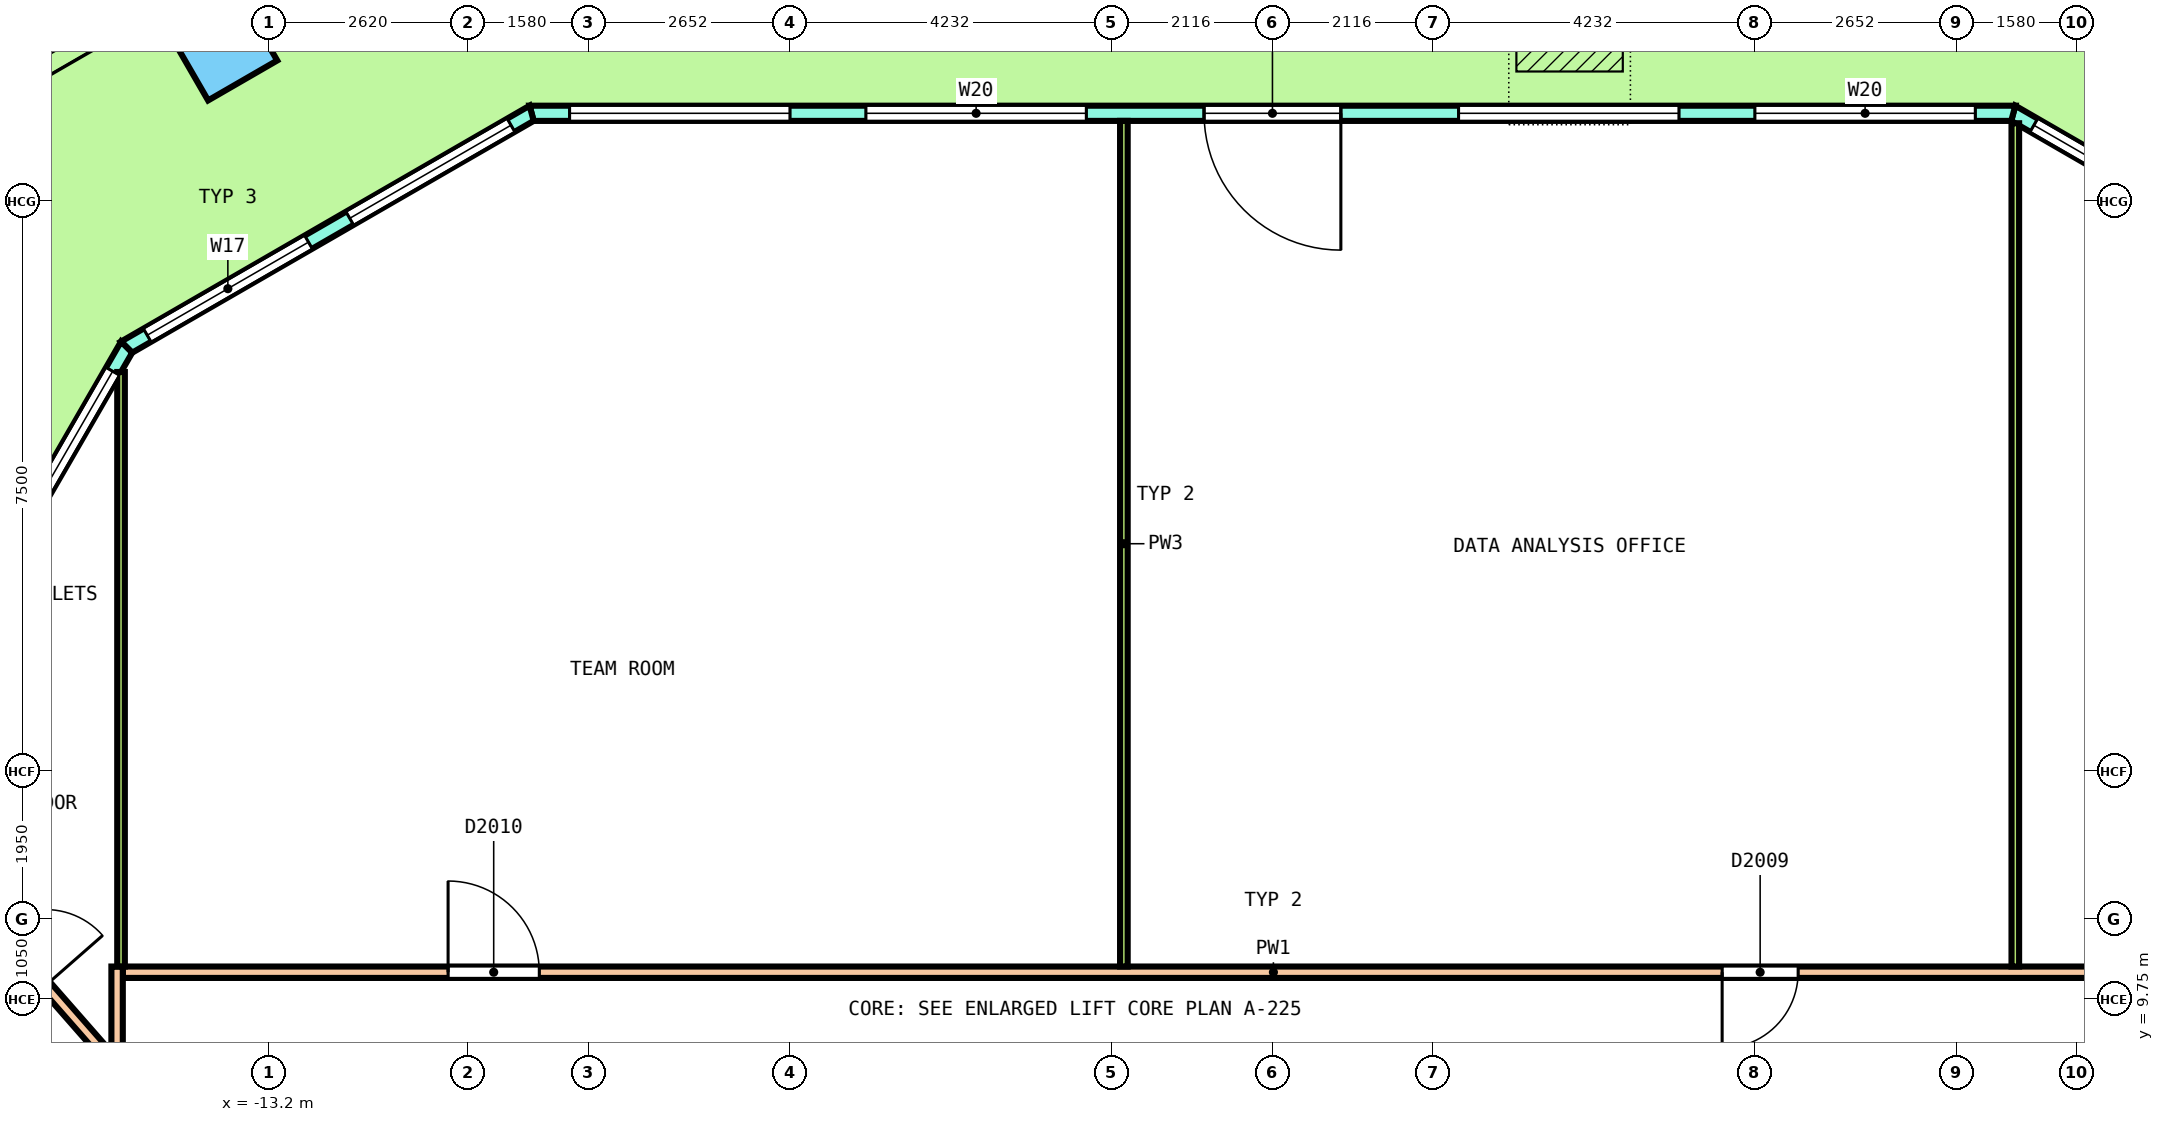
"""IFC4 building model, lengths in metres.
Left out: names, types, materials, properties, quantities, classifications, styles, units other than length and angle.
Written with IfcOpenShell. Run it as: python <this file> out.ifc"""

import sys

from ifc_helpers import new_model, si_unit, direction, frame, frame_2d, origin, origin_2d, place, context, subcontext, project, spatial, polyline, rectangle, outline, extrude, element, fill, save


model = new_model("IFC4")
c1 = context("Model", 3, precision=1e-05, world=origin(), true_north=direction((0.0, 1.0)))
c2 = subcontext(c1, "Body", "Model", "MODEL_VIEW")
j1 = project(units=[si_unit("LENGTHUNIT", "METRE"), si_unit("PLANEANGLEUNIT", "RADIAN")], contexts=[c1])
p1 = place(None, origin())
s1 = spatial("IfcSite", under=j1, at=p1, CompositionType="ELEMENT")
p2 = place(p1, origin())
s2 = spatial("IfcBuilding", under=s1, at=p2, CompositionType="ELEMENT")
p3 = place(p2, frame((0.0, 0.0, 237.4)))
s3 = spatial("IfcBuildingStorey", under=s2, at=p3, CompositionType="ELEMENT", Elevation=237.4)
p4 = place(p3, frame((-13.811, 22.287, 0.0), z_axis=(-0.036227958345, 0.0, 0.999343552055), x_axis=(-0.865314717209, -0.500246354177, -0.031369177763)))
e1 = element("IfcColumn", 1, at=p4, inside=s3, PredefinedType="COLUMN", context=c2, shape_type="SweptSolid", body=[
    extrude(rectangle(XDim=1.05, YDim=1.05, at=origin_2d()), origin(), (0.0, 0.0, 1.0), 3.653),
])
p5 = place(p3, frame((15.075, 18.323, 0.0), z_axis=(0.0, 0.0, 1.0), x_axis=(-0.866029647142, 0.499992650217, 0.0)))
e2 = element("IfcWall", 2, at=p5, inside=s3, PredefinedType="SOLIDWALL", context=c2, shape_type="SweptSolid", body=[
    extrude(outline(polyline([(-0.027, -0.1), (1.008, -0.1), (2.042, -0.1), (3.076, -0.1), (4.111, -0.1), (5.145, -0.1), (6.18, -0.1), (6.126, 0.1), (5.109, 0.1), (4.093, 0.1), (3.076, 0.1), (2.06, 0.1), (1.043, 0.1), (0.027, 0.1), (-0.027, -0.1)])), origin(), (0.0, 0.0, 1.0), 3.7),
])
p6 = place(p5, frame((0.313, 0.0, 0.1)))
e3 = element("IfcOpeningElement", 3, at=p6, cuts=e2, PredefinedType="OPENING", context=c2, shape_type="SweptSolid", body=[
    extrude(rectangle(XDim=2.45, YDim=2.65, at=frame_2d((1.225, 1.325))), frame((0.0, 0.11, 0.0), z_axis=(0.0, -1.0, 0.0), x_axis=(1.0, 0.0, 0.0)), (0.0, 0.0, 1.0), 0.22),
])
p7 = place(p5, frame((3.39, 0.0, 0.1)))
e4 = element("IfcOpeningElement", 4, at=p7, cuts=e2, PredefinedType="OPENING", context=c2, shape_type="SweptSolid", body=[
    extrude(rectangle(XDim=2.45, YDim=2.65, at=frame_2d((1.225, 1.325))), frame((0.0, 0.11, 0.0), z_axis=(0.0, -1.0, 0.0), x_axis=(1.0, 0.0, 0.0)), (0.0, 0.0, 1.0), 0.22),
])
p8 = place(p3, frame((9.746, 21.4, 0.0), z_axis=(0.0, 0.0, 1.0), x_axis=(-1.0, 0.0, 0.0)))
e5 = element("IfcWall", 5, at=p8, inside=s3, PredefinedType="SOLIDWALL", context=c2, shape_type="SweptSolid", body=[
    extrude(outline(polyline([(-0.027, -0.1), (1.002, -0.1), (2.031, -0.1), (3.059, -0.1), (4.088, -0.1), (5.117, -0.1), (6.146, -0.1), (7.175, -0.1), (8.203, -0.1), (9.232, -0.1), (10.261, -0.1), (11.29, -0.1), (12.318, -0.1), (13.347, -0.1), (14.376, -0.1), (15.405, -0.1), (16.433, -0.1), (17.462, -0.1), (18.491, -0.1), (19.52, -0.1), (19.466, 0.1), (18.443, 0.1), (17.42, 0.1), (16.396, 0.1), (15.373, 0.1), (14.35, 0.1), (13.327, 0.1), (12.304, 0.1), (11.281, 0.1), (10.258, 0.1), (9.235, 0.1), (8.212, 0.1), (7.188, 0.1), (6.166, 0.1), (5.142, 0.1), (4.119, 0.1), (3.096, 0.1), (2.073, 0.1), (1.05, 0.1), (0.027, 0.1), (-0.027, -0.1)])), origin(), (0.0, 0.0, 1.0), 3.7),
])
p9 = place(p8, frame((0.499, 0.0, 0.1)))
e6 = element("IfcOpeningElement", 6, at=p9, cuts=e5, PredefinedType="OPENING", context=c2, shape_type="SweptSolid", body=[
    extrude(rectangle(XDim=2.9, YDim=2.65, at=frame_2d((1.45, 1.325))), frame((0.0, 0.11, 0.0), z_axis=(0.0, -1.0, 0.0), x_axis=(1.0, 0.0, 0.0)), (0.0, 0.0, 1.0), 0.22),
])
p10 = place(p8, frame((4.398, 0.0, 0.1)))
e7 = element("IfcOpeningElement", 7, at=p10, cuts=e5, PredefinedType="OPENING", context=c2, shape_type="SweptSolid", body=[
    extrude(rectangle(XDim=2.9, YDim=2.65, at=frame_2d((1.45, 1.325))), frame((0.0, 0.11, 0.0), z_axis=(0.0, -1.0, 0.0), x_axis=(1.0, 0.0, 0.0)), (0.0, 0.0, 1.0), 0.22),
])
p11 = place(p8, frame((8.846, 0.0, 0.0)))
e8 = element("IfcOpeningElement", 8, at=p11, cuts=e5, PredefinedType="OPENING", context=c2, shape_type="SweptSolid", body=[
    extrude(rectangle(XDim=1.8, YDim=2.4, at=frame_2d((0.9, 1.2))), frame((0.0, 0.11, 0.0), z_axis=(0.0, -1.0, 0.0), x_axis=(1.0, 0.0, 0.0)), (0.0, 0.0, 1.0), 0.22),
])
p12 = place(p8, frame((8.846, 0.0, 2.55)))
e9 = element("IfcOpeningElement", 9, at=p12, cuts=e5, PredefinedType="OPENING", context=c2, shape_type="SweptSolid", body=[
    extrude(rectangle(XDim=1.8, YDim=0.2, at=frame_2d((0.9, 0.1))), frame((0.0, 0.11, 0.0), z_axis=(0.0, -1.0, 0.0), x_axis=(1.0, 0.0, 0.0)), (0.0, 0.0, 1.0), 0.22),
])
p13 = place(p8, frame((12.195, 0.0, 0.1)))
e10 = element("IfcOpeningElement", 10, at=p13, cuts=e5, PredefinedType="OPENING", context=c2, shape_type="SweptSolid", body=[
    extrude(rectangle(XDim=2.9, YDim=2.65, at=frame_2d((1.45, 1.325))), frame((0.0, 0.11, 0.0), z_axis=(0.0, -1.0, 0.0), x_axis=(1.0, 0.0, 0.0)), (0.0, 0.0, 1.0), 0.22),
])
p14 = place(p8, frame((16.094, 0.0, 0.1)))
e11 = element("IfcOpeningElement", 11, at=p14, cuts=e5, PredefinedType="OPENING", context=c2, shape_type="SweptSolid", body=[
    extrude(rectangle(XDim=2.9, YDim=2.65, at=frame_2d((1.45, 1.325))), frame((0.0, 0.11, 0.0), z_axis=(0.0, -1.0, 0.0), x_axis=(1.0, 0.0, 0.0)), (0.0, 0.0, 1.0), 0.22),
])
p15 = place(p3, frame((-9.746, 21.4, 0.0), z_axis=(0.0, 0.0, 1.0), x_axis=(-0.866029647142, -0.499992650217, 0.0)))
e12 = element("IfcWall", 12, at=p15, inside=s3, PredefinedType="SOLIDWALL", context=c2, shape_type="SweptSolid", body=[
    extrude(outline(polyline([(-0.027, -0.1), (1.008, -0.1), (2.042, -0.1), (3.076, -0.1), (4.111, -0.1), (5.145, -0.1), (6.18, -0.1), (6.126, 0.1), (5.109, 0.1), (4.093, 0.1), (3.076, 0.1), (2.06, 0.1), (1.043, 0.1), (0.027, 0.1), (-0.027, -0.1)])), origin(), (0.0, 0.0, 1.0), 3.7),
])
p16 = place(p15, frame((0.313, 0.0, 0.1)))
e13 = element("IfcOpeningElement", 13, at=p16, cuts=e12, PredefinedType="OPENING", context=c2, shape_type="SweptSolid", body=[
    extrude(rectangle(XDim=2.45, YDim=2.65, at=frame_2d((1.225, 1.325))), frame((0.0, 0.11, 0.0), z_axis=(0.0, -1.0, 0.0), x_axis=(1.0, 0.0, 0.0)), (0.0, 0.0, 1.0), 0.22),
])
p17 = place(p15, frame((3.39, 0.0, 0.1)))
e14 = element("IfcOpeningElement", 14, at=p17, cuts=e12, PredefinedType="OPENING", context=c2, shape_type="SweptSolid", body=[
    extrude(rectangle(XDim=2.45, YDim=2.65, at=frame_2d((1.225, 1.325))), frame((0.0, 0.11, 0.0), z_axis=(0.0, -1.0, 0.0), x_axis=(1.0, 0.0, 0.0)), (0.0, 0.0, 1.0), 0.22),
])
p18 = place(p3, frame((-15.075, 18.323, 0.0), z_axis=(0.0, 0.0, 1.0), x_axis=(-0.49999683882, -0.866027228885, 0.0)))
e15 = element("IfcWall", 15, at=p18, inside=s3, PredefinedType="SOLIDWALL", context=c2, shape_type="SweptSolid", body=[
    extrude(outline(polyline([(-0.027, -0.1), (1.018, -0.1), (2.062, -0.1), (3.107, -0.1), (4.152, -0.1), (5.197, -0.1), (6.242, -0.1), (7.286, -0.1), (8.331, -0.1), (9.376, -0.1), (10.42, -0.1), (11.465, -0.1), (12.51, -0.1), (13.555, -0.1), (14.6, -0.1), (15.644, -0.1), (16.689, -0.1), (16.635, 0.1), (15.597, 0.1), (14.559, 0.1), (13.521, 0.1), (12.483, 0.1), (11.445, 0.1), (10.407, 0.1), (9.369, 0.1), (8.331, 0.1), (7.293, 0.1), (6.255, 0.1), (5.217, 0.1), (4.179, 0.1), (3.141, 0.1), (2.103, 0.1), (1.065, 0.1), (0.027, 0.1), (-0.027, -0.1)])), origin(), (0.0, 0.0, 1.0), 3.7),
])
p19 = place(p18, frame((0.366, 0.0, 0.1)))
e16 = element("IfcOpeningElement", 16, at=p19, cuts=e15, PredefinedType="OPENING", context=c2, shape_type="SweptSolid", body=[
    extrude(rectangle(XDim=2.6, YDim=2.65, at=frame_2d((1.3, 1.325))), frame((0.0, 0.11, 0.0), z_axis=(0.0, -1.0, 0.0), x_axis=(1.0, 0.0, 0.0)), (0.0, 0.0, 1.0), 0.22),
])
p20 = place(p18, frame((3.699, 0.0, 0.1)))
e17 = element("IfcOpeningElement", 17, at=p20, cuts=e15, PredefinedType="OPENING", context=c2, shape_type="SweptSolid", body=[
    extrude(rectangle(XDim=2.6, YDim=2.65, at=frame_2d((1.3, 1.325))), frame((0.0, 0.11, 0.0), z_axis=(0.0, -1.0, 0.0), x_axis=(1.0, 0.0, 0.0)), (0.0, 0.0, 1.0), 0.22),
])
p21 = place(p18, frame((7.431, 0.0, 0.0)))
e18 = element("IfcOpeningElement", 18, at=p21, cuts=e15, PredefinedType="OPENING", context=c2, shape_type="SweptSolid", body=[
    extrude(rectangle(XDim=1.8, YDim=2.4, at=frame_2d((0.9, 1.2))), frame((0.0, 0.11, 0.0), z_axis=(0.0, -1.0, 0.0), x_axis=(1.0, 0.0, 0.0)), (0.0, 0.0, 1.0), 0.22),
])
p22 = place(p18, frame((7.431, 0.0, 2.55)))
e19 = element("IfcOpeningElement", 19, at=p22, cuts=e15, PredefinedType="OPENING", context=c2, shape_type="SweptSolid", body=[
    extrude(rectangle(XDim=1.8, YDim=0.2, at=frame_2d((0.9, 0.1))), frame((0.0, 0.11, 0.0), z_axis=(0.0, -1.0, 0.0), x_axis=(1.0, 0.0, 0.0)), (0.0, 0.0, 1.0), 0.22),
])
p23 = place(p18, frame((10.364, 0.0, 0.1)))
e20 = element("IfcOpeningElement", 20, at=p23, cuts=e15, PredefinedType="OPENING", context=c2, shape_type="SweptSolid", body=[
    extrude(rectangle(XDim=2.6, YDim=2.65, at=frame_2d((1.3, 1.325))), frame((0.0, 0.11, 0.0), z_axis=(0.0, -1.0, 0.0), x_axis=(1.0, 0.0, 0.0)), (0.0, 0.0, 1.0), 0.22),
])
p24 = place(p18, frame((13.696, 0.0, 0.1)))
e21 = element("IfcOpeningElement", 21, at=p24, cuts=e15, PredefinedType="OPENING", context=c2, shape_type="SweptSolid", body=[
    extrude(rectangle(XDim=2.6, YDim=2.65, at=frame_2d((1.3, 1.325))), frame((0.0, 0.11, 0.0), z_axis=(0.0, -1.0, 0.0), x_axis=(1.0, 0.0, 0.0)), (0.0, 0.0, 1.0), 0.22),
])
p25 = place(p3, frame((-18.352, 12.447, 0.0), z_axis=(0.0, 0.0, 1.0), x_axis=(0.659058801192, -0.752091415036, 0.0)))
e22 = element("IfcWall", 22, at=p25, inside=s3, PredefinedType="PARTITIONING", context=c2, shape_type="SweptSolid", body=[
    extrude(rectangle(XDim=4.708, YDim=0.15, at=frame_2d((2.354, 0.0))), origin(), (0.0, 0.0, 1.0), 2.8),
])
p26 = place(p25, frame((2.354, 0.0, 0.0)))
e23 = element("IfcOpeningElement", 23, at=p26, cuts=e22, PredefinedType="OPENING", context=c2, shape_type="SweptSolid", body=[
    extrude(rectangle(XDim=1.0, YDim=2.1, at=frame_2d((0.5, 1.05))), frame((0.0, 0.085, 0.0), z_axis=(0.0, -1.0, 0.0), x_axis=(1.0, 0.0, 0.0)), (0.0, 0.0, 1.0), 0.17),
])
p27 = place(p3, frame((-19.985, 9.619, 0.0), z_axis=(0.0, 0.0, 1.0), x_axis=(0.888662364403, -0.458562102767, 0.0)))
e24 = element("IfcWall", 24, at=p27, inside=s3, PredefinedType="PARTITIONING", context=c2, shape_type="SweptSolid", body=[
    extrude(rectangle(XDim=5.31, YDim=0.15, at=frame_2d((2.655, 0.0))), origin(), (0.0, 0.0, 1.0), 2.8),
])
p28 = place(p3, frame((-15.125, 10.1, 0.0), z_axis=(0.0, 0.0, 1.0), x_axis=(1.0, 0.0, 0.0)))
e25 = element("IfcWall", 25, at=p28, inside=s3, PredefinedType="PARTITIONING", context=c2, shape_type="SweptSolid", body=[
    extrude(rectangle(XDim=30.275, YDim=0.15, at=frame_2d((15.137, 0.0))), origin(), (0.0, 0.0, 1.0), 2.8),
])
p29 = place(p28, frame((28.004, 0.0, 0.0)))
e26 = element("IfcOpeningElement", 26, at=p29, cuts=e25, PredefinedType="OPENING", context=c2, shape_type="SweptSolid", body=[
    extrude(rectangle(XDim=1.0, YDim=2.1, at=frame_2d((0.5, 1.05))), frame((0.0, 0.085, 0.0), z_axis=(0.0, -1.0, 0.0), x_axis=(1.0, 0.0, 0.0)), (0.0, 0.0, 1.0), 0.17),
])
p30 = place(p28, frame((21.041, 0.0, 0.0)))
e27 = element("IfcOpeningElement", 27, at=p30, cuts=e25, PredefinedType="OPENING", context=c2, shape_type="SweptSolid", body=[
    extrude(rectangle(XDim=1.0, YDim=2.1, at=frame_2d((0.5, 1.05))), frame((0.0, 0.085, 0.0), z_axis=(0.0, -1.0, 0.0), x_axis=(1.0, 0.0, 0.0)), (0.0, 0.0, 1.0), 0.17),
])
p31 = place(p28, frame((4.28, 0.0, 0.0)))
e28 = element("IfcOpeningElement", 28, at=p31, cuts=e25, PredefinedType="OPENING", context=c2, shape_type="SweptSolid", body=[
    extrude(rectangle(XDim=1.2, YDim=2.1, at=frame_2d((0.6, 1.05))), frame((0.0, 0.085, 0.0), z_axis=(0.0, -1.0, 0.0), x_axis=(1.0, 0.0, 0.0)), (0.0, 0.0, 1.0), 0.17),
])
p32 = place(p3, frame((-15.2, 8.775, 0.0), z_axis=(0.0, 0.0, 1.0), x_axis=(0.0, 1.0, 0.0)))
e29 = element("IfcWall", 29, at=p32, inside=s3, PredefinedType="PARTITIONING", context=c2, shape_type="SweptSolid", body=[
    extrude(rectangle(XDim=1.4, YDim=0.15, at=frame_2d((0.7, 0.0))), origin(), (0.0, 0.0, 1.0), 2.8),
])
p33 = place(p3, frame((9.773, 10.175, 0.0), z_axis=(0.0, 0.0, 1.0), x_axis=(0.0, 1.0, 0.0)))
e30 = element("IfcWall", 30, at=p33, inside=s3, PredefinedType="PARTITIONING", context=c2, shape_type="SweptSolid", body=[
    extrude(rectangle(XDim=11.094, YDim=0.1, at=frame_2d((5.547, 0.0))), origin(), (0.0, 0.0, 1.0), 2.8),
])
p34 = place(p3, frame((-1.955, 10.175, 0.0), z_axis=(0.0, 0.0, 1.0), x_axis=(0.0, 1.0, 0.0)))
e31 = element("IfcWall", 31, at=p34, inside=s3, PredefinedType="PARTITIONING", context=c2, shape_type="SweptSolid", body=[
    extrude(rectangle(XDim=11.125, YDim=0.1, at=frame_2d((5.562, 0.0))), origin(), (0.0, 0.0, 1.0), 2.8),
])
p35 = place(p3, frame((-15.148, 10.175, 0.0), z_axis=(0.0, 0.0, 1.0), x_axis=(0.0, 1.0, 0.0)))
e32 = element("IfcWall", 32, at=p35, inside=s3, PredefinedType="PARTITIONING", context=c2, shape_type="SweptSolid", body=[
    extrude(rectangle(XDim=7.822, YDim=0.1, at=frame_2d((3.911, 0.0))), origin(), (0.0, 0.0, 1.0), 2.8),
])
p36 = place(p7, origin())
e33 = element("IfcWindow", 33, at=p36, inside=s3, PartitioningType="SINGLE_PANEL", PredefinedType="WINDOW", context=c2, shape_type="SweptSolid", body=[
    extrude(rectangle(XDim=2.45, YDim=2.65, at=frame_2d((1.225, 1.325))), frame((0.0, 0.03, 0.0), z_axis=(0.0, -1.0, 0.0), x_axis=(1.0, 0.0, 0.0)), (0.0, 0.0, 1.0), 0.06),
])
fill(e4, e33)
p37 = place(p9, origin())
e34 = element("IfcWindow", 34, at=p37, inside=s3, PartitioningType="SINGLE_PANEL", PredefinedType="WINDOW", context=c2, shape_type="SweptSolid", body=[
    extrude(rectangle(XDim=2.9, YDim=2.65, at=frame_2d((1.45, 1.325))), frame((0.0, 0.03, 0.0), z_axis=(0.0, -1.0, 0.0), x_axis=(1.0, 0.0, 0.0)), (0.0, 0.0, 1.0), 0.06),
])
fill(e6, e34)
p38 = place(p10, origin())
e35 = element("IfcWindow", 35, at=p38, inside=s3, PartitioningType="SINGLE_PANEL", PredefinedType="WINDOW", context=c2, shape_type="SweptSolid", body=[
    extrude(rectangle(XDim=2.9, YDim=2.65, at=frame_2d((1.45, 1.325))), frame((0.0, 0.03, 0.0), z_axis=(0.0, -1.0, 0.0), x_axis=(1.0, 0.0, 0.0)), (0.0, 0.0, 1.0), 0.06),
])
fill(e7, e35)
p39 = place(p11, origin())
e36 = element("IfcDoor", 36, at=p39, inside=s3, OperationType="DOUBLE_DOOR_SINGLE_SWING", PredefinedType="DOOR", context=c2, shape_type="SweptSolid", body=[
    extrude(rectangle(XDim=1.8, YDim=2.4, at=frame_2d((0.9, 1.2))), frame((0.0, 0.025, 0.0), z_axis=(0.0, -1.0, 0.0), x_axis=(1.0, 0.0, 0.0)), (0.0, 0.0, 1.0), 0.05),
])
fill(e8, e36)
p40 = place(p12, origin())
e37 = element("IfcWindow", 37, at=p40, inside=s3, PartitioningType="SINGLE_PANEL", PredefinedType="WINDOW", context=c2, shape_type="SweptSolid", body=[
    extrude(rectangle(XDim=1.8, YDim=0.2, at=frame_2d((0.9, 0.1))), frame((0.0, 0.03, 0.0), z_axis=(0.0, -1.0, 0.0), x_axis=(1.0, 0.0, 0.0)), (0.0, 0.0, 1.0), 0.06),
])
fill(e9, e37)
p41 = place(p13, origin())
e38 = element("IfcWindow", 38, at=p41, inside=s3, PartitioningType="SINGLE_PANEL", PredefinedType="WINDOW", context=c2, shape_type="SweptSolid", body=[
    extrude(rectangle(XDim=2.9, YDim=2.65, at=frame_2d((1.45, 1.325))), frame((0.0, 0.03, 0.0), z_axis=(0.0, -1.0, 0.0), x_axis=(1.0, 0.0, 0.0)), (0.0, 0.0, 1.0), 0.06),
])
fill(e10, e38)
p42 = place(p14, origin())
e39 = element("IfcWindow", 39, at=p42, inside=s3, PartitioningType="SINGLE_PANEL", PredefinedType="WINDOW", context=c2, shape_type="SweptSolid", body=[
    extrude(rectangle(XDim=2.9, YDim=2.65, at=frame_2d((1.45, 1.325))), frame((0.0, 0.03, 0.0), z_axis=(0.0, -1.0, 0.0), x_axis=(1.0, 0.0, 0.0)), (0.0, 0.0, 1.0), 0.06),
])
fill(e11, e39)
p43 = place(p16, origin())
e40 = element("IfcWindow", 40, at=p43, inside=s3, PartitioningType="SINGLE_PANEL", PredefinedType="WINDOW", context=c2, shape_type="SweptSolid", body=[
    extrude(rectangle(XDim=2.45, YDim=2.65, at=frame_2d((1.225, 1.325))), frame((0.0, 0.03, 0.0), z_axis=(0.0, -1.0, 0.0), x_axis=(1.0, 0.0, 0.0)), (0.0, 0.0, 1.0), 0.06),
])
fill(e13, e40)
p44 = place(p17, origin())
e41 = element("IfcWindow", 41, at=p44, inside=s3, PartitioningType="SINGLE_PANEL", PredefinedType="WINDOW", context=c2, shape_type="SweptSolid", body=[
    extrude(rectangle(XDim=2.45, YDim=2.65, at=frame_2d((1.225, 1.325))), frame((0.0, 0.03, 0.0), z_axis=(0.0, -1.0, 0.0), x_axis=(1.0, 0.0, 0.0)), (0.0, 0.0, 1.0), 0.06),
])
fill(e14, e41)
p45 = place(p19, origin())
e42 = element("IfcWindow", 42, at=p45, inside=s3, PartitioningType="SINGLE_PANEL", PredefinedType="WINDOW", context=c2, shape_type="SweptSolid", body=[
    extrude(rectangle(XDim=2.6, YDim=2.65, at=frame_2d((1.3, 1.325))), frame((0.0, 0.03, 0.0), z_axis=(0.0, -1.0, 0.0), x_axis=(1.0, 0.0, 0.0)), (0.0, 0.0, 1.0), 0.06),
])
fill(e16, e42)
p46 = place(p30, origin())
e43 = element("IfcDoor", 43, at=p46, inside=s3, OperationType="SINGLE_SWING_LEFT", PredefinedType="DOOR", context=c2, shape_type="SweptSolid", body=[
    extrude(rectangle(XDim=1.0, YDim=2.1, at=frame_2d((0.5, 1.05))), frame((0.0, 0.025, 0.0), z_axis=(0.0, -1.0, 0.0), x_axis=(1.0, 0.0, 0.0)), (0.0, 0.0, 1.0), 0.05),
])
fill(e27, e43)
p47 = place(p31, origin())
e44 = element("IfcDoor", 44, at=p47, inside=s3, OperationType="DOUBLE_DOOR_SINGLE_SWING", PredefinedType="DOOR", context=c2, shape_type="SweptSolid", body=[
    extrude(rectangle(XDim=1.2, YDim=2.1, at=frame_2d((0.6, 1.05))), frame((0.0, 0.025, 0.0), z_axis=(0.0, -1.0, 0.0), x_axis=(1.0, 0.0, 0.0)), (0.0, 0.0, 1.0), 0.05),
])
fill(e28, e44)
save(model, sys.argv[1])
